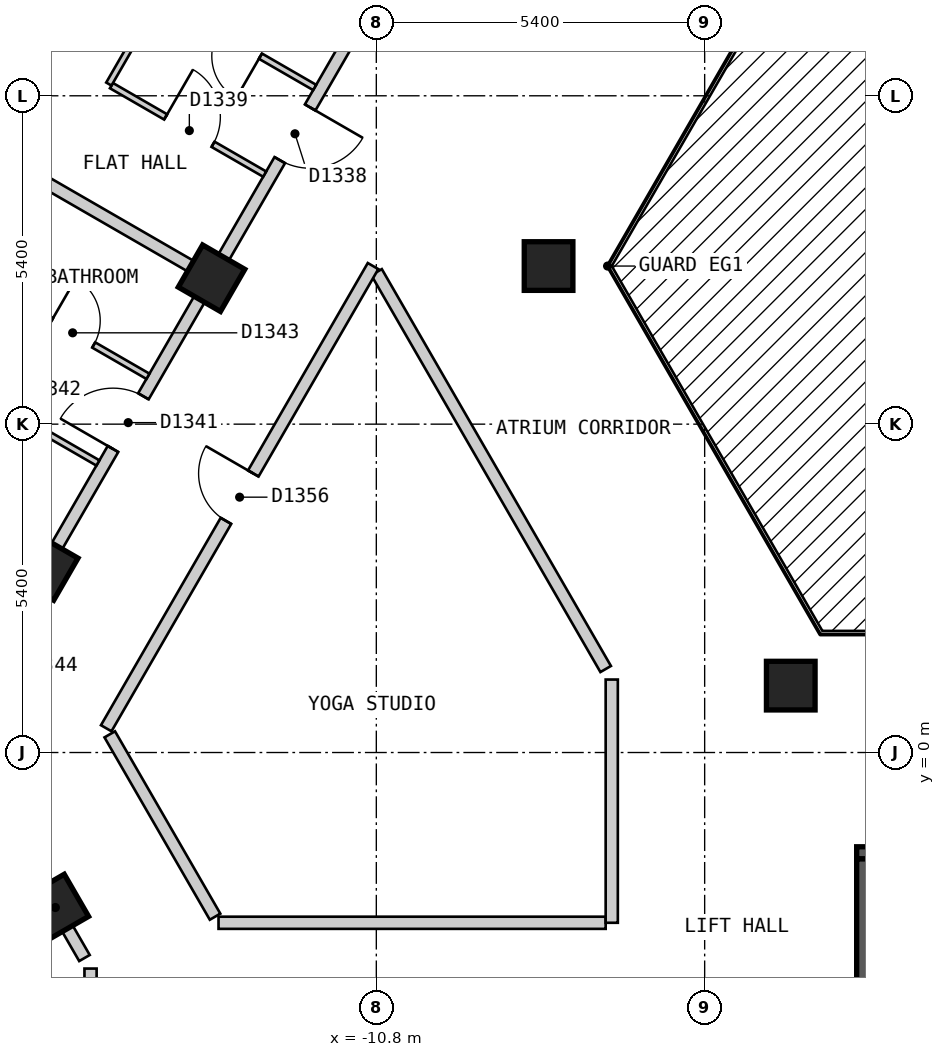
"""IFC4 building model, lengths in metres.
Left out: names, types, materials, properties, quantities, classifications, styles, units other than length and angle.
Written with IfcOpenShell. Run it as: python <this file> out.ifc"""

import sys

from ifc_helpers import new_model, si_unit, direction, frame, frame_2d, origin, origin_2d, place, context, subcontext, project, spatial, polyline, rectangle, outline, extrude, element, fill, save


model = new_model("IFC4")
c1 = context("Model", 3, precision=1e-05, world=origin(), true_north=direction((0.0, 1.0)))
c2 = subcontext(c1, "Body", "Model", "MODEL_VIEW")
j1 = project(units=[si_unit("LENGTHUNIT", "METRE"), si_unit("PLANEANGLEUNIT", "RADIAN")], contexts=[c1])
p1 = place(None, origin())
s1 = spatial("IfcSite", under=j1, at=p1, CompositionType="ELEMENT")
p2 = place(p1, origin())
s2 = spatial("IfcBuilding", under=s1, at=p2, CompositionType="ELEMENT")
p3 = place(p2, frame((0.0, 0.0, 135.6)))
s3 = spatial("IfcBuildingStorey", under=s2, at=p3, CompositionType="ELEMENT", Elevation=135.6)
for number, where, z_axis, x_axis in (
    (1, (-16.079, -2.549, 0.0), (0.0, 0.0, 1.0), (0.5, -0.866, 0.0)),
    (2, (-7.967, 8.0, 0.0), (0.0, 0.0, 1.0), (1.0, 0.0, 0.0)),
    (3, (-13.51, 7.8, 0.0), (0.0, 0.0, 1.0), (-0.5, -0.866, 0.0)),
    (4, (-3.984, 1.1, 0.0), (0.0, 0.0, 1.0), (1.0, 0.0, 0.0)),
    (5, (-16.253, 3.05, 0.0), (0.0, 0.0, 1.0), (-0.5, -0.866, 0.0)),
):
    element("IfcColumn", number, at=place(p3, frame(where, z_axis=z_axis, x_axis=x_axis)), inside=s3, PredefinedType="COLUMN", context=c2, shape_type="SweptSolid", body=[
        extrude(rectangle(XDim=0.8, YDim=0.8, at=origin_2d()), origin(), (0.0, 0.0, 1.0), 3.0),
    ])
p4 = place(p3, frame((-28.218, -2.025, 0.0), z_axis=(0.0, 0.0, 1.0), x_axis=(0.500017503135, -0.866015298109, 0.0)))
e6 = element("IfcWall", 6, at=p4, inside=s3, PredefinedType="SOLIDWALL", context=c2, shape_type="SweptSolid", body=[
    extrude(outline(polyline([(0.0, -0.15), (24.711, -0.15), (24.631, 0.15), (0.08, 0.15), (0.0, -0.15)])), origin(), (0.0, 0.0, 1.0), 2.7),
])
p5 = place(p4, frame((2.857, 0.0, 0.15)))
e7 = element("IfcOpeningElement", 7, at=p5, cuts=e6, PredefinedType="OPENING", context=c2, shape_type="SweptSolid", body=[
    extrude(rectangle(XDim=1.5, YDim=2.1, at=frame_2d((0.75, 1.05))), frame((0.0, 0.16, 0.0), z_axis=(0.0, -1.0, 0.0), x_axis=(1.0, 0.0, 0.0)), (0.0, 0.0, 1.0), 0.32),
])
p6 = place(p4, frame((8.689, 0.0, 0.15)))
e8 = element("IfcOpeningElement", 8, at=p6, cuts=e6, PredefinedType="OPENING", context=c2, shape_type="SweptSolid", body=[
    extrude(rectangle(XDim=1.5, YDim=2.1, at=frame_2d((0.75, 1.05))), frame((0.0, 0.16, 0.0), z_axis=(0.0, -1.0, 0.0), x_axis=(1.0, 0.0, 0.0)), (0.0, 0.0, 1.0), 0.32),
])
p7 = place(p4, frame((14.52, 0.0, 0.15)))
e9 = element("IfcOpeningElement", 9, at=p7, cuts=e6, PredefinedType="OPENING", context=c2, shape_type="SweptSolid", body=[
    extrude(rectangle(XDim=1.5, YDim=2.1, at=frame_2d((0.75, 1.05))), frame((0.0, 0.16, 0.0), z_axis=(0.0, -1.0, 0.0), x_axis=(1.0, 0.0, 0.0)), (0.0, 0.0, 1.0), 0.32),
])
p8 = place(p4, frame((20.351, 0.0, 0.15)))
e10 = element("IfcOpeningElement", 10, at=p8, cuts=e6, PredefinedType="OPENING", context=c2, shape_type="SweptSolid", body=[
    extrude(rectangle(XDim=1.5, YDim=2.1, at=frame_2d((0.75, 1.05))), frame((0.0, 0.16, 0.0), z_axis=(0.0, -1.0, 0.0), x_axis=(1.0, 0.0, 0.0)), (0.0, 0.0, 1.0), 0.32),
])
p9 = place(p3, frame((-2.9, -1.65, 0.0), z_axis=(0.0, 0.0, 1.0), x_axis=(1.0, 0.0, 0.0)))
e11 = element("IfcWall", 11, at=p9, inside=s3, PredefinedType="SOLIDWALL", context=c2, shape_type="SweptSolid", body=[
    extrude(rectangle(XDim=5.8, YDim=0.2, at=frame_2d((2.9, 0.0))), origin(), (0.0, 0.0, 1.0), 2.7),
])
p10 = place(p9, frame((0.3, 0.0, 0.0)))
e12 = element("IfcOpeningElement", 12, at=p10, cuts=e11, PredefinedType="OPENING", context=c2, shape_type="SweptSolid", body=[
    extrude(rectangle(XDim=1.2, YDim=2.1, at=frame_2d((0.6, 1.05))), frame((0.0, 0.11, 0.0), z_axis=(0.0, -1.0, 0.0), x_axis=(1.0, 0.0, 0.0)), (0.0, 0.0, 1.0), 0.22),
])
p11 = place(p3, frame((-2.8, -4.5, 0.0), z_axis=(0.0, 0.0, 1.0), x_axis=(0.0, 1.0, 0.0)))
e13 = element("IfcWall", 13, at=p11, inside=s3, PredefinedType="SOLIDWALL", context=c2, shape_type="SweptSolid", body=[
    extrude(rectangle(XDim=2.75, YDim=0.2, at=frame_2d((1.375, 0.0))), origin(), (0.0, 0.0, 1.0), 2.7),
])
p12 = place(p3, frame((-10.796, 7.9, 0.0), z_axis=(0.0, 0.0, 1.0), x_axis=(0.499954271211, -0.866051803703, 0.0)))
e14 = element("IfcWall", 14, at=p12, inside=s3, PredefinedType="PARTITIONING", context=c2, shape_type="SweptSolid", body=[
    extrude(rectangle(XDim=7.536, YDim=0.2, at=frame_2d((3.768, 0.0))), origin(), (0.0, 0.0, 1.0), 2.7),
])
p13 = place(p3, frame((-15.184, 0.299, 0.0), z_axis=(0.0, 0.0, 1.0), x_axis=(0.500149577091, -0.865939028186, 0.0)))
e15 = element("IfcWall", 15, at=p13, inside=s3, PredefinedType="PARTITIONING", context=c2, shape_type="SweptSolid", body=[
    extrude(rectangle(XDim=3.463, YDim=0.2, at=frame_2d((1.732, 0.0))), origin(), (0.0, 0.0, 1.0), 2.7),
])
p14 = place(p3, frame((-17.724, 0.299, 0.0), z_axis=(0.0, 0.0, 1.0), x_axis=(0.499923815713, -0.866069384335, 0.0)))
e16 = element("IfcWall", 16, at=p14, inside=s3, PredefinedType="PARTITIONING", context=c2, shape_type="SweptSolid", body=[
    extrude(rectangle(XDim=3.289, YDim=0.2, at=frame_2d((1.644, 0.0))), origin(), (0.0, 0.0, 1.0), 2.7),
])
p15 = place(p3, frame((-16.02, -2.652, 0.0), z_axis=(0.0, 0.0, 1.0), x_axis=(0.499764376199, -0.866161398518, 0.0)))
e17 = element("IfcWall", 17, at=p15, inside=s3, PredefinedType="PARTITIONING", context=c2, shape_type="SweptSolid", body=[
    extrude(rectangle(XDim=0.84, YDim=0.2, at=frame_2d((0.42, 0.0))), origin(), (0.0, 0.0, 1.0), 2.7),
])
p16 = place(p3, frame((-13.395, -2.8, 0.0), z_axis=(0.0, 0.0, 1.0), x_axis=(1.0, 0.0, 0.0)))
e18 = element("IfcWall", 18, at=p16, inside=s3, PredefinedType="PARTITIONING", context=c2, shape_type="SweptSolid", body=[
    extrude(rectangle(XDim=6.367, YDim=0.2, at=frame_2d((3.184, 0.0))), origin(), (0.0, 0.0, 1.0), 2.7),
])
p17 = place(p3, frame((-15.242, 0.399, 0.0), z_axis=(0.0, 0.0, 1.0), x_axis=(0.499953615651, 0.866052182145, 0.0)))
e19 = element("IfcWall", 19, at=p17, inside=s3, PredefinedType="PARTITIONING", context=c2, shape_type="SweptSolid", body=[
    extrude(rectangle(XDim=8.777, YDim=0.2, at=frame_2d((4.388, 0.0))), origin(), (0.0, 0.0, 1.0), 2.7),
])
p18 = place(p17, frame((3.938, 0.0, 0.0)))
e20 = element("IfcOpeningElement", 20, at=p18, cuts=e19, PredefinedType="OPENING", context=c2, shape_type="SweptSolid", body=[
    extrude(rectangle(XDim=0.9, YDim=2.1, at=frame_2d((0.45, 1.05))), frame((0.0, 0.11, 0.0), z_axis=(0.0, -1.0, 0.0), x_axis=(1.0, 0.0, 0.0)), (0.0, 0.0, 1.0), 0.22),
])
p19 = place(p3, frame((-17.724, 0.5, 0.0), z_axis=(0.0, 0.0, 1.0), x_axis=(0.499994801602, 0.86602840506, 0.0)))
e21 = element("IfcWall", 21, at=p19, inside=s3, PredefinedType="PARTITIONING", context=c2, shape_type="SweptSolid", body=[
    extrude(rectangle(XDim=16.916, YDim=0.2, at=frame_2d((8.458, 0.0))), origin(), (0.0, 0.0, 1.0), 2.7),
])
p20 = place(p19, frame((10.672, 0.0, 0.0)))
e22 = element("IfcOpeningElement", 22, at=p20, cuts=e21, PredefinedType="OPENING", context=c2, shape_type="SweptSolid", body=[
    extrude(rectangle(XDim=1.0, YDim=2.1, at=frame_2d((0.5, 1.05))), frame((0.0, 0.11, 0.0), z_axis=(0.0, -1.0, 0.0), x_axis=(1.0, 0.0, 0.0)), (0.0, 0.0, 1.0), 0.22),
])
p21 = place(p19, frame((5.187, 0.0, 0.0)))
e23 = element("IfcOpeningElement", 23, at=p21, cuts=e21, PredefinedType="OPENING", context=c2, shape_type="SweptSolid", body=[
    extrude(rectangle(XDim=1.0, YDim=2.1, at=frame_2d((0.5, 1.05))), frame((0.0, 0.11, 0.0), z_axis=(0.0, -1.0, 0.0), x_axis=(1.0, 0.0, 0.0)), (0.0, 0.0, 1.0), 0.22),
])
p22 = place(p19, frame((0.566, 0.0, 0.0)))
e24 = element("IfcOpeningElement", 24, at=p22, cuts=e21, PredefinedType="OPENING", context=c2, shape_type="SweptSolid", body=[
    extrude(rectangle(XDim=1.0, YDim=2.1, at=frame_2d((0.5, 1.05))), frame((0.0, 0.11, 0.0), z_axis=(0.0, -1.0, 0.0), x_axis=(1.0, 0.0, 0.0)), (0.0, 0.0, 1.0), 0.22),
])
p23 = place(p3, frame((-6.928, -2.8, 0.0), z_axis=(0.0, 0.0, 1.0), x_axis=(0.0, 1.0, 0.0)))
e25 = element("IfcWall", 25, at=p23, inside=s3, PredefinedType="PARTITIONING", context=c2, shape_type="SweptSolid", body=[
    extrude(rectangle(XDim=4.0, YDim=0.2, at=frame_2d((2.0, 0.0))), origin(), (0.0, 0.0, 1.0), 2.7),
])
p24 = place(p3, frame((-15.5, -6.6, 0.0), z_axis=(0.0, 0.0, 1.0), x_axis=(0.0, 1.0, 0.0)))
e26 = element("IfcWall", 26, at=p24, inside=s3, PredefinedType="PARTITIONING", context=c2, shape_type="SweptSolid", body=[
    extrude(rectangle(XDim=3.047, YDim=0.2, at=frame_2d((1.523, 0.0))), origin(), (0.0, 0.0, 1.0), 2.7),
])
p25 = place(p3, frame((-17.898, 6.217, 0.0), z_axis=(0.0, 0.0, 1.0), x_axis=(0.86592000186, -0.500182517066, 0.0)))
e27 = element("IfcWall", 27, at=p25, inside=s3, PredefinedType="PARTITIONING", context=c2, shape_type="SweptSolid", body=[
    extrude(rectangle(XDim=2.909, YDim=0.1, at=frame_2d((1.455, 0.0))), origin(), (0.0, 0.0, 1.0), 2.7),
])
p26 = place(p25, frame((1.029, 0.0, 0.0)))
e28 = element("IfcOpeningElement", 28, at=p26, cuts=e27, PredefinedType="OPENING", context=c2, shape_type="SweptSolid", body=[
    extrude(rectangle(XDim=0.9, YDim=2.1, at=frame_2d((0.45, 1.05))), frame((0.0, 0.06, 0.0), z_axis=(0.0, -1.0, 0.0), x_axis=(1.0, 0.0, 0.0)), (0.0, 0.0, 1.0), 0.12),
])
p27 = place(p3, frame((-17.076, 7.642, 0.0), z_axis=(0.0, 0.0, 1.0), x_axis=(0.866003949776, -0.500037157592, 0.0)))
e29 = element("IfcWall", 29, at=p27, inside=s3, PredefinedType="PARTITIONING", context=c2, shape_type="SweptSolid", body=[
    extrude(rectangle(XDim=2.91, YDim=0.1, at=frame_2d((1.455, 0.0))), origin(), (0.0, 0.0, 1.0), 2.7),
])
p28 = place(p27, frame((1.08, 0.0, 0.0)))
e30 = element("IfcOpeningElement", 30, at=p28, cuts=e29, PredefinedType="OPENING", context=c2, shape_type="SweptSolid", body=[
    extrude(rectangle(XDim=0.8, YDim=2.1, at=frame_2d((0.4, 1.05))), frame((0.0, 0.06, 0.0), z_axis=(0.0, -1.0, 0.0), x_axis=(1.0, 0.0, 0.0)), (0.0, 0.0, 1.0), 0.12),
])
p29 = place(p3, frame((-14.334, 12.392, 0.0), z_axis=(0.0, 0.0, 1.0), x_axis=(0.866003949776, -0.500037157592, 0.0)))
e31 = element("IfcWall", 31, at=p29, inside=s3, PredefinedType="PARTITIONING", context=c2, shape_type="SweptSolid", body=[
    extrude(rectangle(XDim=2.91, YDim=0.1, at=frame_2d((1.455, 0.0))), origin(), (0.0, 0.0, 1.0), 2.7),
])
p30 = place(p29, frame((1.08, 0.0, 0.0)))
e32 = element("IfcOpeningElement", 32, at=p30, cuts=e31, PredefinedType="OPENING", context=c2, shape_type="SweptSolid", body=[
    extrude(rectangle(XDim=0.8, YDim=2.1, at=frame_2d((0.4, 1.05))), frame((0.0, 0.06, 0.0), z_axis=(0.0, -1.0, 0.0), x_axis=(1.0, 0.0, 0.0)), (0.0, 0.0, 1.0), 0.12),
])
p31 = place(p3, frame((-15.156, 10.967, 0.0), z_axis=(0.0, 0.0, 1.0), x_axis=(0.866003949776, -0.500037157592, 0.0)))
e33 = element("IfcWall", 33, at=p31, inside=s3, PredefinedType="PARTITIONING", context=c2, shape_type="SweptSolid", body=[
    extrude(rectangle(XDim=2.91, YDim=0.1, at=frame_2d((1.455, 0.0))), origin(), (0.0, 0.0, 1.0), 2.7),
])
p32 = place(p31, frame((1.029, 0.0, 0.0)))
e34 = element("IfcOpeningElement", 34, at=p32, cuts=e33, PredefinedType="OPENING", context=c2, shape_type="SweptSolid", body=[
    extrude(rectangle(XDim=0.9, YDim=2.1, at=frame_2d((0.45, 1.05))), frame((0.0, 0.06, 0.0), z_axis=(0.0, -1.0, 0.0), x_axis=(1.0, 0.0, 0.0)), (0.0, 0.0, 1.0), 0.12),
])
p33 = place(p3, frame((-15.199, 10.993, 0.0), z_axis=(0.0, 0.0, 1.0), x_axis=(0.499885210257, 0.866091667531, 0.0)))
e35 = element("IfcWall", 35, at=p33, inside=s3, PredefinedType="PARTITIONING", context=c2, shape_type="SweptSolid", body=[
    extrude(rectangle(XDim=3.463, YDim=0.1, at=frame_2d((1.731, 0.0))), origin(), (0.0, 0.0, 1.0), 2.7),
])
p34 = place(p3, frame((-22.257, 12.85, 0.0), z_axis=(0.0, 0.0, 1.0), x_axis=(0.866047370643, -0.499961950354, 0.0)))
e36 = element("IfcWall", 36, at=p34, inside=s3, PredefinedType="PARTITIONING", context=c2, shape_type="SweptSolid", body=[
    extrude(rectangle(XDim=10.001, YDim=0.2, at=frame_2d((5.0, 0.0))), origin(), (0.0, 0.0, 1.0), 2.7),
])
p35 = place(p20, origin())
e37 = element("IfcDoor", 37, at=p35, inside=s3, OperationType="SINGLE_SWING_RIGHT", PredefinedType="DOOR", context=c2, shape_type="SweptSolid", body=[
    extrude(rectangle(XDim=1.0, YDim=2.1, at=frame_2d((0.5, 1.05))), frame((0.0, 0.025, 0.0), z_axis=(0.0, -1.0, 0.0), x_axis=(1.0, 0.0, 0.0)), (0.0, 0.0, 1.0), 0.05),
])
fill(e22, e37)
p36 = place(p32, origin())
e38 = element("IfcDoor", 38, at=p36, inside=s3, OperationType="SINGLE_SWING_LEFT", PredefinedType="DOOR", context=c2, shape_type="SweptSolid", body=[
    extrude(rectangle(XDim=0.9, YDim=2.1, at=frame_2d((0.45, 1.05))), frame((0.0, 0.025, 0.0), z_axis=(0.0, -1.0, 0.0), x_axis=(1.0, 0.0, 0.0)), (0.0, 0.0, 1.0), 0.05),
])
fill(e34, e38)
p37 = place(p30, origin())
e39 = element("IfcDoor", 39, at=p37, inside=s3, OperationType="SINGLE_SWING_RIGHT", PredefinedType="DOOR", context=c2, shape_type="SweptSolid", body=[
    extrude(rectangle(XDim=0.8, YDim=2.1, at=frame_2d((0.4, 1.05))), frame((0.0, 0.025, 0.0), z_axis=(0.0, -1.0, 0.0), x_axis=(1.0, 0.0, 0.0)), (0.0, 0.0, 1.0), 0.05),
])
fill(e32, e39)
p38 = place(p21, origin())
e40 = element("IfcDoor", 40, at=p38, inside=s3, OperationType="SINGLE_SWING_LEFT", PredefinedType="DOOR", context=c2, shape_type="SweptSolid", body=[
    extrude(rectangle(XDim=1.0, YDim=2.1, at=frame_2d((0.5, 1.05))), frame((0.0, 0.025, 0.0), z_axis=(0.0, -1.0, 0.0), x_axis=(1.0, 0.0, 0.0)), (0.0, 0.0, 1.0), 0.05),
])
fill(e23, e40)
p39 = place(p28, origin())
e41 = element("IfcDoor", 41, at=p39, inside=s3, OperationType="SINGLE_SWING_LEFT", PredefinedType="DOOR", context=c2, shape_type="SweptSolid", body=[
    extrude(rectangle(XDim=0.8, YDim=2.1, at=frame_2d((0.4, 1.05))), frame((0.0, 0.025, 0.0), z_axis=(0.0, -1.0, 0.0), x_axis=(1.0, 0.0, 0.0)), (0.0, 0.0, 1.0), 0.05),
])
fill(e30, e41)
p40 = place(p18, origin())
e42 = element("IfcDoor", 42, at=p40, inside=s3, OperationType="SINGLE_SWING_RIGHT", PredefinedType="DOOR", context=c2, shape_type="SweptSolid", body=[
    extrude(rectangle(XDim=0.9, YDim=2.1, at=frame_2d((0.45, 1.05))), frame((0.0, 0.025, 0.0), z_axis=(0.0, -1.0, 0.0), x_axis=(1.0, 0.0, 0.0)), (0.0, 0.0, 1.0), 0.05),
])
fill(e20, e42)
save(model, sys.argv[1])
